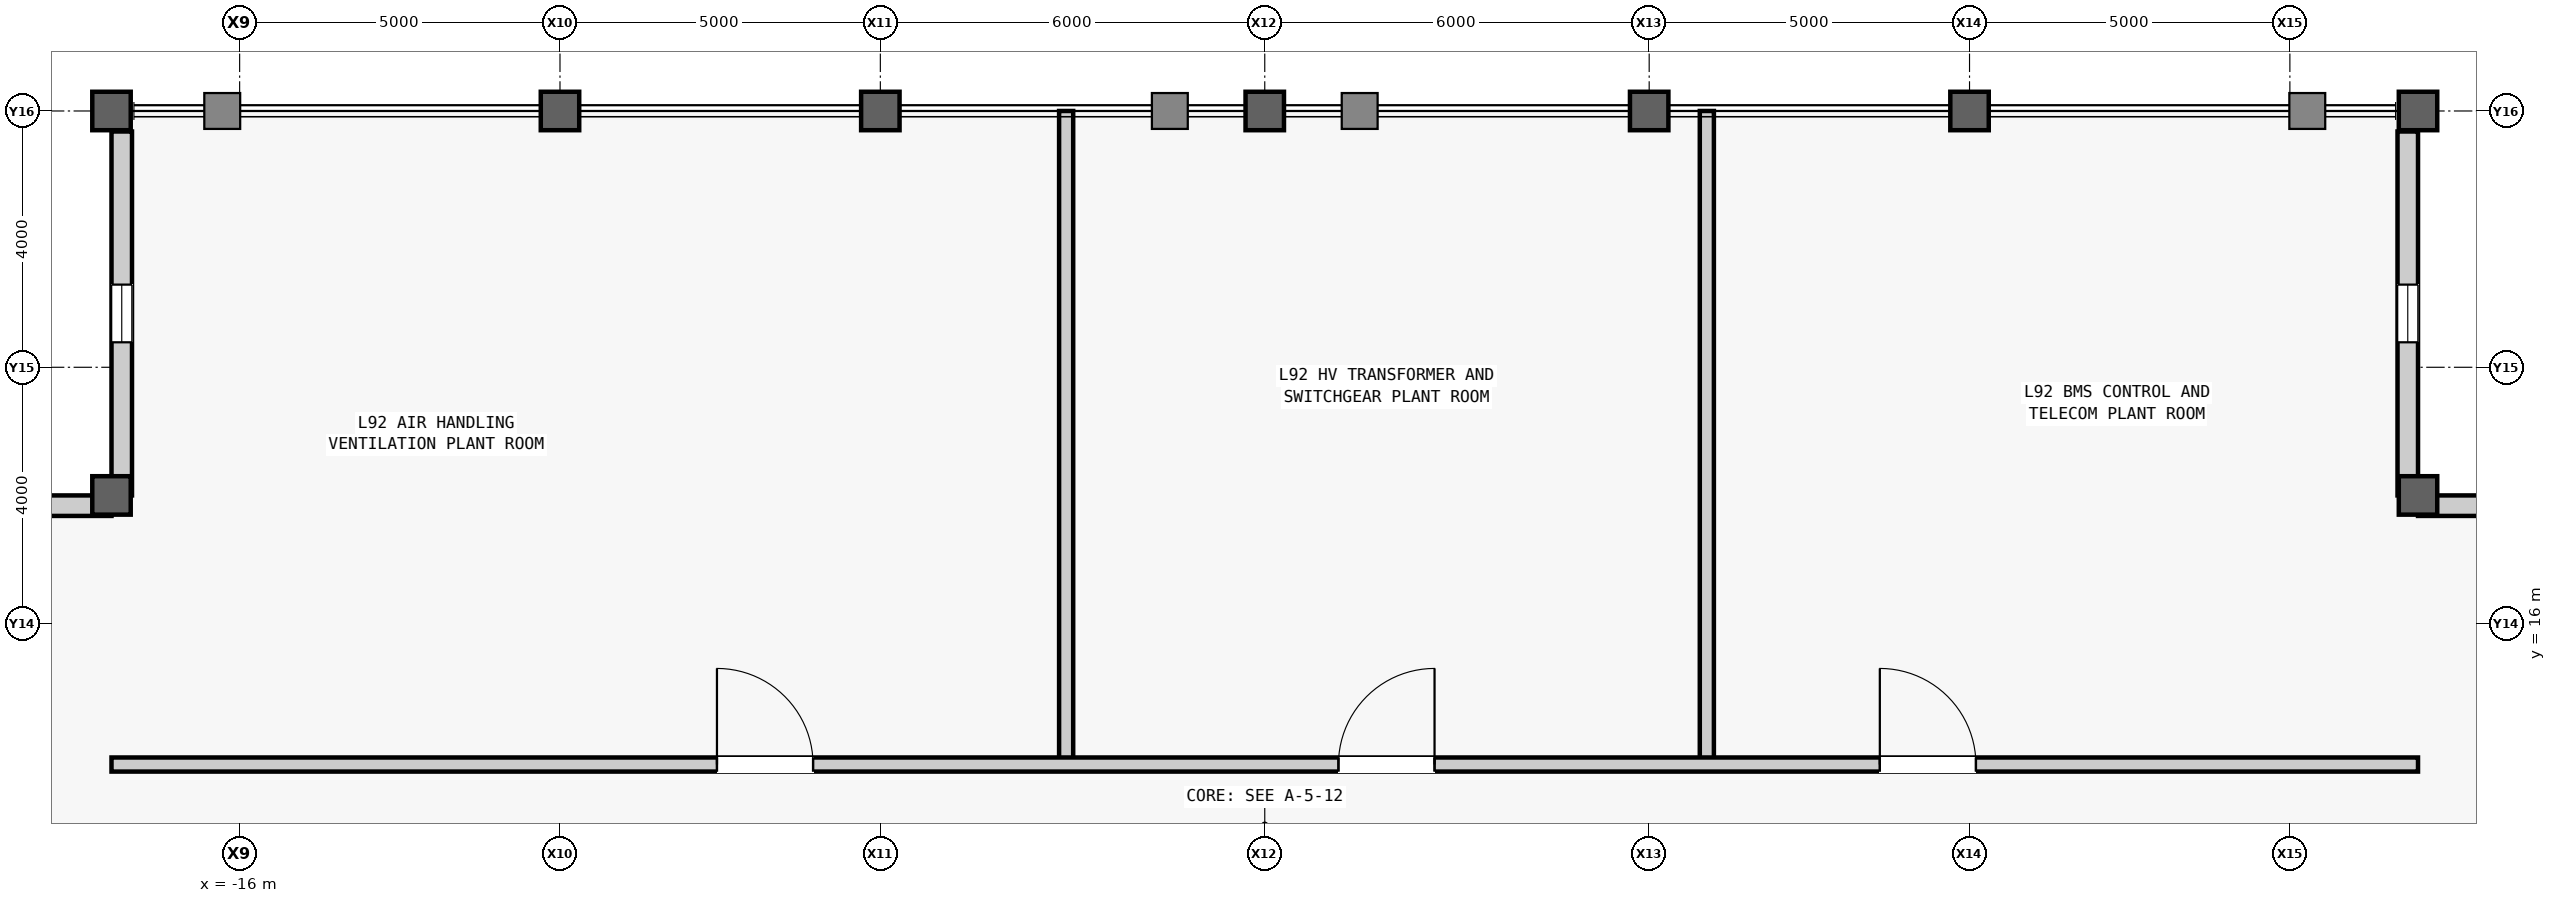
"""IFC4 building model, lengths in metres.
Left out: names, types, materials, properties, quantities, classifications, styles, units other than length and angle.
Written with IfcOpenShell. Run it as: python <this file> out.ifc"""

import sys

from ifc_helpers import new_model, si_unit, direction, frame, frame_2d, origin, origin_2d, place, context, subcontext, project, spatial, rectangle, hollow_rectangle, extrude, source, transform, mapped, element, fill, save


model = new_model("IFC4")
c1 = context("Model", 3, precision=1e-05, world=origin(), true_north=direction((0.0, 1.0)))
c2 = subcontext(c1, "Body", "Model", "MODEL_VIEW")
j1 = project(units=[si_unit("LENGTHUNIT", "METRE"), si_unit("PLANEANGLEUNIT", "RADIAN")], contexts=[c1])
p1 = place(None, origin())
s1 = spatial("IfcSite", under=j1, at=p1, CompositionType="ELEMENT")
p2 = place(p1, origin())
s2 = spatial("IfcBuilding", under=s1, at=p2, CompositionType="ELEMENT")
p3 = place(p2, frame((0.0, 0.0, 389.9)))
s3 = spatial("IfcBuildingStorey", under=s2, at=p3, CompositionType="ELEMENT", Elevation=389.9)
m1 = source(origin(), c2, "Body", "SweptSolid", [
    extrude(hollow_rectangle(XDim=0.6, YDim=0.6, WallThickness=0.035, at=origin_2d()), origin(), (0.0, 0.0, 1.0), 4.8),
])
for number, where, z_axis, x_axis in (
    (1, (-18.0, 18.0, 0.0), (0.0, 0.0, 1.0), (1.0, 0.0, 0.0)),
    (2, (-18.0, 24.0, 0.0), (0.0, 0.0, 1.0), (1.0, 0.0, 0.0)),
    (3, (-11.0, 24.0, 0.0), (0.0, 0.0, 1.0), (1.0, 0.0, 0.0)),
    (4, (-6.0, 24.0, 0.0), (0.0, 0.0, 1.0), (1.0, 0.0, 0.0)),
    (5, (0.0, 24.0, 0.0), (0.0, 0.0, 1.0), (1.0, 0.0, 0.0)),
    (6, (6.0, 24.0, 0.0), (0.0, 0.0, 1.0), (1.0, 0.0, 0.0)),
    (7, (11.0, 24.0, 0.0), (0.0, 0.0, 1.0), (1.0, 0.0, 0.0)),
    (8, (18.0, 18.0, 0.0), (0.0, 0.0, 1.0), (1.0, 0.0, 0.0)),
    (9, (18.0, 24.0, 0.0), (0.0, 0.0, 1.0), (1.0, 0.0, 0.0)),
):
    element("IfcColumn", number, at=place(p3, frame(where, z_axis=z_axis, x_axis=x_axis)), inside=s3, PredefinedType="COLUMN", context=c2, shape_type="MappedRepresentation", body=[
        mapped(m1, transform((0.0, 0.0, 0.0), scale=1.0)),
    ])
m2 = source(origin(), c2, "Body", "SweptSolid", [
    extrude(rectangle(XDim=5.68, YDim=0.32, at=frame_2d((2.84, 0.0))), origin(), (0.0, 0.0, 1.0), 3.901),
])
p4 = place(p3, frame((18.0, 17.84, 0.0), z_axis=(0.0, 0.0, 1.0), x_axis=(1.0, 0.0, 0.0)))
e10 = element("IfcWall", 10, at=p4, inside=s3, PredefinedType="STANDARD", context=c2, shape_type="MappedRepresentation", body=[
    mapped(m2, transform((0.0, 0.0, 0.0), scale=1.0)),
])
m3 = source(origin(), c2, "Body", "SweptSolid", [
    extrude(rectangle(XDim=0.9, YDim=2.4, at=frame_2d((0.45, 1.2))), frame((0.0, 0.17, 0.0), z_axis=(0.0, -1.0, 0.0), x_axis=(1.0, 0.0, 0.0)), (0.0, 0.0, 1.0), 0.34),
])
p5 = place(p4, frame((2.39, 0.0, 0.7)))
e11 = element("IfcOpeningElement", 11, at=p5, cuts=e10, PredefinedType="OPENING", context=c2, shape_type="MappedRepresentation", body=[
    mapped(m3, transform((0.0, 0.0, 0.0), scale=1.0)),
])
p6 = place(p3, frame((17.84, 18.0, 0.0), z_axis=(0.0, 0.0, 1.0), x_axis=(0.0, 1.0, 0.0)))
e12 = element("IfcWall", 12, at=p6, inside=s3, PredefinedType="STANDARD", context=c2, shape_type="MappedRepresentation", body=[
    mapped(m2, transform((0.0, 0.0, 0.0), scale=1.0)),
])
p7 = place(p6, frame((2.39, 0.0, 0.7)))
e13 = element("IfcOpeningElement", 13, at=p7, cuts=e12, PredefinedType="OPENING", context=c2, shape_type="MappedRepresentation", body=[
    mapped(m3, transform((0.0, 0.0, 0.0), scale=1.0)),
])
p8 = place(p3, frame((-17.84, 18.0, 0.0), z_axis=(0.0, 0.0, 1.0), x_axis=(0.0, 1.0, 0.0)))
e14 = element("IfcWall", 14, at=p8, inside=s3, PredefinedType="STANDARD", context=c2, shape_type="MappedRepresentation", body=[
    mapped(m2, transform((0.0, 0.0, 0.0), scale=1.0)),
])
p9 = place(p8, frame((2.39, 0.0, 0.7)))
e15 = element("IfcOpeningElement", 15, at=p9, cuts=e14, PredefinedType="OPENING", context=c2, shape_type="MappedRepresentation", body=[
    mapped(m3, transform((0.0, 0.0, 0.0), scale=1.0)),
])
p10 = place(p3, frame((-18.0, 17.84, 0.0), z_axis=(0.0, 0.0, 1.0), x_axis=(-1.0, 0.0, 0.0)))
e16 = element("IfcWall", 16, at=p10, inside=s3, PredefinedType="STANDARD", context=c2, shape_type="MappedRepresentation", body=[
    mapped(m2, transform((0.0, 0.0, 0.0), scale=1.0)),
])
p11 = place(p10, frame((2.39, 0.0, 0.7)))
e17 = element("IfcOpeningElement", 17, at=p11, cuts=e16, PredefinedType="OPENING", context=c2, shape_type="MappedRepresentation", body=[
    mapped(m3, transform((0.0, 0.0, 0.0), scale=1.0)),
])
m4 = source(origin(), c2, "Body", "SweptSolid", [
    extrude(rectangle(XDim=10.2, YDim=0.22, at=frame_2d((5.1, 0.0))), origin(), (0.0, 0.0, 1.0), 4.45),
])
for number, where, z_axis, x_axis in (
    (18, (-3.1, 13.8, 0.0), (0.0, 0.0, 1.0), (0.0, 1.0, 0.0)),
    (19, (6.9, 13.8, 0.0), (0.0, 0.0, 1.0), (0.0, 1.0, 0.0)),
):
    element("IfcWall", number, at=place(p3, frame(where, z_axis=z_axis, x_axis=x_axis)), inside=s3, PredefinedType="PARTITIONING", context=c2, shape_type="MappedRepresentation", body=[
        mapped(m4, transform((0.0, 0.0, 0.0), scale=1.0)),
    ])
m5 = source(origin(), c2, "Body", "SweptSolid", [
    extrude(rectangle(XDim=36.0, YDim=0.22, at=frame_2d((18.0, 0.0))), origin(), (0.0, 0.0, 1.0), 4.45),
])
p12 = place(p3, frame((-18.0, 13.8, 0.0), z_axis=(0.0, 0.0, 1.0), x_axis=(1.0, 0.0, 0.0)))
e20 = element("IfcWall", 20, at=p12, inside=s3, PredefinedType="PARTITIONING", context=c2, shape_type="MappedRepresentation", body=[
    mapped(m5, transform((0.0, 0.0, 0.0), scale=1.0)),
])
m6 = source(origin(), c2, "Body", "SweptSolid", [
    extrude(rectangle(XDim=1.5, YDim=2.3, at=frame_2d((0.75, 1.15))), frame((0.0, 0.12, 0.0), z_axis=(0.0, -1.0, 0.0), x_axis=(1.0, 0.0, 0.0)), (0.0, 0.0, 1.0), 0.24),
])
p13 = place(p12, frame((9.45, 0.0, 0.0)))
e21 = element("IfcOpeningElement", 21, at=p13, cuts=e20, PredefinedType="OPENING", context=c2, shape_type="MappedRepresentation", body=[
    mapped(m6, transform((0.0, 0.0, 0.0), scale=1.0)),
])
p14 = place(p12, frame((19.15, 0.0, 0.0)))
e22 = element("IfcOpeningElement", 22, at=p14, cuts=e20, PredefinedType="OPENING", context=c2, shape_type="MappedRepresentation", body=[
    mapped(m6, transform((0.0, 0.0, 0.0), scale=1.0)),
])
p15 = place(p12, frame((27.6, 0.0, 0.0)))
e23 = element("IfcOpeningElement", 23, at=p15, cuts=e20, PredefinedType="OPENING", context=c2, shape_type="MappedRepresentation", body=[
    mapped(m6, transform((0.0, 0.0, 0.0), scale=1.0)),
])
m7 = source(origin(), c2, "Body", "SweptSolid", [
    extrude(rectangle(XDim=0.9, YDim=2.4, at=frame_2d((0.45, 1.2))), frame((0.0, 0.03, 0.0), z_axis=(0.0, -1.0, 0.0), x_axis=(1.0, 0.0, 0.0)), (0.0, 0.0, 1.0), 0.06),
])
p16 = place(p7, origin())
e24 = element("IfcWindow", 24, at=p16, inside=s3, PartitioningType="SINGLE_PANEL", PredefinedType="WINDOW", context=c2, shape_type="MappedRepresentation", body=[
    mapped(m7, transform((0.0, 0.0, 0.0), scale=1.0)),
])
fill(e13, e24)
p17 = place(p9, origin())
e25 = element("IfcWindow", 25, at=p17, inside=s3, PartitioningType="SINGLE_PANEL", PredefinedType="WINDOW", context=c2, shape_type="MappedRepresentation", body=[
    mapped(m7, transform((0.0, 0.0, 0.0), scale=1.0)),
])
fill(e15, e25)
m8 = source(origin(), c2, "Body", "SweptSolid", [
    extrude(rectangle(XDim=1.5, YDim=2.3, at=frame_2d((0.75, 1.15))), frame((0.0, 0.025, 0.0), z_axis=(0.0, -1.0, 0.0), x_axis=(1.0, 0.0, 0.0)), (0.0, 0.0, 1.0), 0.05),
])
p18 = place(p13, origin())
e26 = element("IfcDoor", 26, at=p18, inside=s3, OperationType="SINGLE_SWING_LEFT", PredefinedType="DOOR", context=c2, shape_type="MappedRepresentation", body=[
    mapped(m8, transform((0.0, 0.0, 0.0), scale=1.0)),
])
fill(e21, e26)
p19 = place(p14, origin())
e27 = element("IfcDoor", 27, at=p19, inside=s3, OperationType="SINGLE_SWING_RIGHT", PredefinedType="DOOR", context=c2, shape_type="MappedRepresentation", body=[
    mapped(m8, transform((0.0, 0.0, 0.0), scale=1.0)),
])
fill(e22, e27)
p20 = place(p15, origin())
e28 = element("IfcDoor", 28, at=p20, inside=s3, OperationType="SINGLE_SWING_LEFT", PredefinedType="DOOR", context=c2, shape_type="MappedRepresentation", body=[
    mapped(m8, transform((0.0, 0.0, 0.0), scale=1.0)),
])
fill(e23, e28)
save(model, sys.argv[1])
